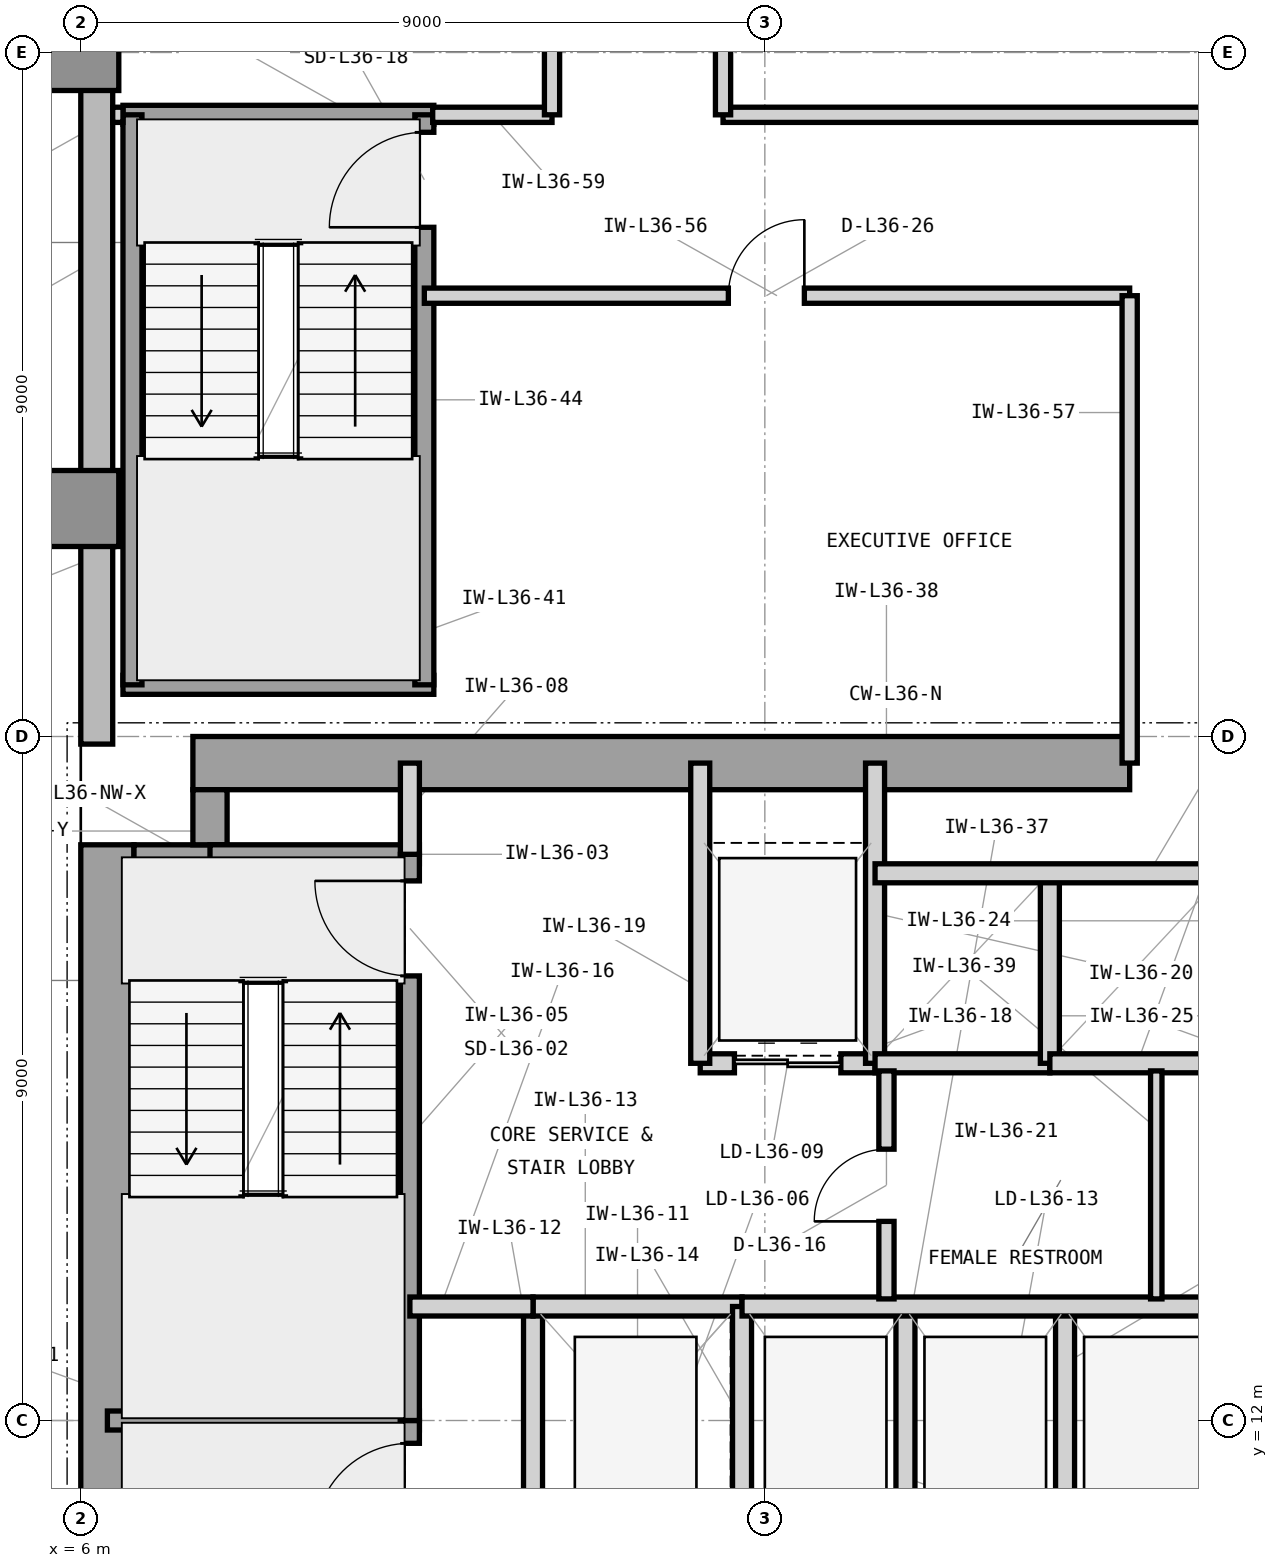
"""IFC4 building model, lengths in metres.
Left out: names, types, materials, properties, quantities, classifications, styles, units other than length and angle.
Written with IfcOpenShell. Run it as: python <this file> out.ifc"""

import sys

from ifc_helpers import new_model, si_unit, direction, frame, frame_2d, origin, origin_2d, place, context, subcontext, project, spatial, rectangle, extrude, element, fill, save


model = new_model("IFC4")
c1 = context("Model", 3, precision=1e-05, world=origin(), true_north=direction((0.0, 1.0)))
c2 = subcontext(c1, "Body", "Model", "MODEL_VIEW")
j1 = project(units=[si_unit("LENGTHUNIT", "METRE"), si_unit("PLANEANGLEUNIT", "RADIAN")], contexts=[c1])
p1 = place(None, origin())
s1 = spatial("IfcSite", under=j1, at=p1, CompositionType="ELEMENT")
p2 = place(p1, origin())
s2 = spatial("IfcBuilding", under=s1, at=p2, CompositionType="ELEMENT")
p3 = place(p2, frame((0.0, 0.0, 151.8)))
s3 = spatial("IfcBuildingStorey", under=s2, at=p3, CompositionType="ELEMENT", Elevation=151.8)
p4 = place(p3, frame((6.35, 4.425, 0.0), z_axis=(0.0, 0.0, 1.0), x_axis=(0.0, 1.0, 0.0)))
e1 = element("IfcWall", 1, at=p4, inside=s3, PredefinedType="SHEAR", context=c2, shape_type="SweptSolid", body=[
    extrude(rectangle(XDim=15.15, YDim=0.7, at=frame_2d((7.575, 0.0))), origin(), (0.0, 0.0, 1.0), 3.9),
])
p5 = place(p3, frame((7.475, 20.65, 0.0), z_axis=(0.0, 0.0, 1.0), x_axis=(1.0, 0.0, 0.0)))
e2 = element("IfcWall", 2, at=p5, inside=s3, PredefinedType="SHEAR", context=c2, shape_type="SweptSolid", body=[
    extrude(rectangle(XDim=12.325, YDim=0.7, at=frame_2d((6.163, 0.0))), origin(), (0.0, 0.0, 1.0), 3.9),
])
p6 = place(p3, frame((6.7, 19.35, 0.0), z_axis=(0.0, 0.0, 1.0), x_axis=(1.0, 0.0, 0.0)))
e3 = element("IfcWall", 3, at=p6, inside=s3, PredefinedType="SHEAR", context=c2, shape_type="SweptSolid", body=[
    extrude(rectangle(XDim=1.225, YDim=0.45, at=frame_2d((0.613, 0.0))), origin(), (0.0, 0.0, 1.0), 3.9),
])
p7 = place(p3, frame((7.7, 19.575, 0.0), z_axis=(0.0, 0.0, 1.0), x_axis=(0.0, 1.0, 0.0)))
e4 = element("IfcWall", 4, at=p7, inside=s3, PredefinedType="SHEAR", context=c2, shape_type="SweptSolid", body=[
    extrude(rectangle(XDim=0.725, YDim=0.45, at=frame_2d((0.363, 0.0))), origin(), (0.0, 0.0, 1.0), 3.9),
])
for number, where, z_axis, x_axis in (
    (5, (6.0, 24.0, 0.0), (0.0, 0.0, 1.0), (1.0, 0.0, 0.0)),
    (6, (6.0, 30.0, 0.0), (0.0, 0.0, 1.0), (1.0, 0.0, 0.0)),
):
    element("IfcColumn", number, at=place(p3, frame(where, z_axis=z_axis, x_axis=x_axis)), inside=s3, PredefinedType="COLUMN", context=c2, shape_type="SweptSolid", body=[
        extrude(rectangle(XDim=1.0, YDim=1.0, at=origin_2d()), origin(), (0.0, 0.0, 1.0), 3.9),
    ])
p8 = place(p3, frame((6.21, 46.4, 0.0), z_axis=(0.0, 0.0, 1.0), x_axis=(0.0, -1.0, 0.0)))
e7 = element("IfcWall", 7, at=p8, inside=s3, PredefinedType="STANDARD", context=c2, shape_type="SweptSolid", body=[
    extrude(rectangle(XDim=25.5, YDim=0.42, at=frame_2d((12.75, 0.0))), origin(), (0.0, 0.0, 1.0), 3.62),
])
p9 = place(p8, frame((11.5, 0.0, 0.85)))
e8 = element("IfcOpeningElement", 8, at=p9, cuts=e7, PredefinedType="OPENING", context=c2, shape_type="SweptSolid", body=[
    extrude(rectangle(XDim=2.5, YDim=2.25, at=frame_2d((1.25, 1.125))), frame((0.0, 0.22, 0.0), z_axis=(0.0, -1.0, 0.0), x_axis=(1.0, 0.0, 0.0)), (0.0, 0.0, 1.0), 0.44),
])
p10 = place(p3, frame((6.35, 12.0, 0.0), z_axis=(0.0, 0.0, 1.0), x_axis=(1.0, 0.0, 0.0)))
e9 = element("IfcWall", 9, at=p10, inside=s3, PredefinedType="SHEAR", context=c2, shape_type="SweptSolid", body=[
    extrude(rectangle(XDim=4.105, YDim=0.25, at=frame_2d((2.052, 0.0))), origin(), (0.0, 0.0, 1.0), 3.9),
])
p11 = place(p3, frame((7.7, 19.45, 0.0), z_axis=(0.0, 0.0, 1.0), x_axis=(1.0, 0.0, 0.0)))
e10 = element("IfcWall", 10, at=p11, inside=s3, PredefinedType="SHEAR", context=c2, shape_type="SweptSolid", body=[
    extrude(rectangle(XDim=2.755, YDim=0.25, at=frame_2d((1.377, 0.0))), origin(), (0.0, 0.0, 1.0), 3.9),
])
p12 = place(p3, frame((10.33, 4.55, 0.0), z_axis=(0.0, 0.0, 1.0), x_axis=(0.0, 1.0, 0.0)))
e11 = element("IfcWall", 11, at=p12, inside=s3, PredefinedType="SHEAR", context=c2, shape_type="SweptSolid", body=[
    extrude(rectangle(XDim=7.45, YDim=0.25, at=frame_2d((3.725, 0.0))), origin(), (0.0, 0.0, 1.0), 3.9),
])
p13 = place(p12, frame((5.9, 0.0, 0.0)))
e12 = element("IfcOpeningElement", 12, at=p13, cuts=e11, PredefinedType="OPENING", context=c2, shape_type="SweptSolid", body=[
    extrude(rectangle(XDim=1.25, YDim=2.2, at=frame_2d((0.625, 1.1))), frame((0.0, 0.135, 0.0), z_axis=(0.0, -1.0, 0.0), x_axis=(1.0, 0.0, 0.0)), (0.0, 0.0, 1.0), 0.27),
])
p14 = place(p3, frame((10.33, 12.0, 0.0), z_axis=(0.0, 0.0, 1.0), x_axis=(0.0, 1.0, 0.0)))
e13 = element("IfcWall", 13, at=p14, inside=s3, PredefinedType="SHEAR", context=c2, shape_type="SweptSolid", body=[
    extrude(rectangle(XDim=7.45, YDim=0.25, at=frame_2d((3.725, 0.0))), origin(), (0.0, 0.0, 1.0), 3.9),
])
p15 = place(p14, frame((5.85, 0.0, 0.0)))
e14 = element("IfcOpeningElement", 14, at=p15, cuts=e13, PredefinedType="OPENING", context=c2, shape_type="SweptSolid", body=[
    extrude(rectangle(XDim=1.25, YDim=2.2, at=frame_2d((0.625, 1.1))), frame((0.0, 0.135, 0.0), z_axis=(0.0, -1.0, 0.0), x_axis=(1.0, 0.0, 0.0)), (0.0, 0.0, 1.0), 0.27),
])
p16 = place(p3, frame((10.33, 19.45, 0.0), z_axis=(0.0, 0.0, 1.0), x_axis=(0.0, 1.0, 0.0)))
e15 = element("IfcWall", 15, at=p16, inside=s3, PredefinedType="PARTITIONING", context=c2, shape_type="SweptSolid", body=[
    extrude(rectangle(XDim=1.2, YDim=0.25, at=frame_2d((0.6, 0.0))), origin(), (0.0, 0.0, 1.0), 2.754),
])
p17 = place(p3, frame((11.95, 10.5, 0.0), z_axis=(0.0, 0.0, 1.0), x_axis=(0.0, 1.0, 0.0)))
e16 = element("IfcWall", 16, at=p17, inside=s3, PredefinedType="PARTITIONING", context=c2, shape_type="SweptSolid", body=[
    extrude(rectangle(XDim=3.0, YDim=0.25, at=frame_2d((1.5, 0.0))), origin(), (0.0, 0.0, 1.0), 3.61),
])
p18 = place(p3, frame((11.95, 13.5, 0.0), z_axis=(0.0, 0.0, 1.0), x_axis=(1.0, 0.0, 0.0)))
e17 = element("IfcWall", 17, at=p18, inside=s3, PredefinedType="PARTITIONING", context=c2, shape_type="SweptSolid", body=[
    extrude(rectangle(XDim=2.75, YDim=0.25, at=frame_2d((1.375, 0.0))), origin(), (0.0, 0.0, 1.0), 3.066),
])
p19 = place(p3, frame((14.7, 10.5, 0.0), z_axis=(0.0, 0.0, 1.0), x_axis=(0.0, 1.0, 0.0)))
e18 = element("IfcWall", 18, at=p19, inside=s3, PredefinedType="PARTITIONING", context=c2, shape_type="SweptSolid", body=[
    extrude(rectangle(XDim=3.0, YDim=0.25, at=frame_2d((1.5, 0.0))), origin(), (0.0, 0.0, 1.0), 3.61),
])
p20 = place(p3, frame((10.33, 13.5, 0.0), z_axis=(0.0, 0.0, 1.0), x_axis=(1.0, 0.0, 0.0)))
e19 = element("IfcWall", 19, at=p20, inside=s3, PredefinedType="PARTITIONING", context=c2, shape_type="SweptSolid", body=[
    extrude(rectangle(XDim=1.62, YDim=0.25, at=frame_2d((0.81, 0.0))), origin(), (0.0, 0.0, 1.0), 3.066),
])
p21 = place(p3, frame((14.15, 16.7, 0.0), z_axis=(0.0, 0.0, 1.0), x_axis=(1.0, 0.0, 0.0)))
e20 = element("IfcWall", 20, at=p21, inside=s3, PredefinedType="PARTITIONING", context=c2, shape_type="SweptSolid", body=[
    extrude(rectangle(XDim=2.3, YDim=0.25, at=frame_2d((1.15, 0.0))), origin(), (0.0, 0.0, 1.0), 3.066),
])
p22 = place(p21, frame((0.45, 0.0, 0.0)))
e21 = element("IfcOpeningElement", 21, at=p22, cuts=e20, PredefinedType="OPENING", context=c2, shape_type="SweptSolid", body=[
    extrude(rectangle(XDim=1.4, YDim=2.35, at=frame_2d((0.7, 1.175))), frame((0.0, 0.135, 0.0), z_axis=(0.0, -1.0, 0.0), x_axis=(1.0, 0.0, 0.0)), (0.0, 0.0, 1.0), 0.27),
])
for number, where, z_axis, x_axis in (
    (22, (14.15, 16.7, 0.0), (0.0, 0.0, 1.0), (0.0, 1.0, 0.0)),
    (23, (16.45, 16.7, 0.0), (0.0, 0.0, 1.0), (0.0, 1.0, 0.0)),
):
    element("IfcWall", number, at=place(p3, frame(where, z_axis=z_axis, x_axis=x_axis)), inside=s3, PredefinedType="PARTITIONING", context=c2, shape_type="SweptSolid", body=[
        extrude(rectangle(XDim=3.95, YDim=0.25, at=frame_2d((1.975, 0.0))), origin(), (0.0, 0.0, 1.0), 3.61),
    ])
p23 = place(p3, frame((16.45, 16.7, 0.0), z_axis=(0.0, 0.0, 1.0), x_axis=(1.0, 0.0, 0.0)))
e24 = element("IfcWall", 24, at=p23, inside=s3, PredefinedType="PARTITIONING", context=c2, shape_type="SweptSolid", body=[
    extrude(rectangle(XDim=2.3, YDim=0.25, at=frame_2d((1.15, 0.0))), origin(), (0.0, 0.0, 1.0), 3.066),
])
p24 = place(p3, frame((18.75, 16.7, 0.0), z_axis=(0.0, 0.0, 1.0), x_axis=(0.0, 1.0, 0.0)))
e25 = element("IfcWall", 25, at=p24, inside=s3, PredefinedType="PARTITIONING", context=c2, shape_type="SweptSolid", body=[
    extrude(rectangle(XDim=2.5, YDim=0.25, at=frame_2d((1.25, 0.0))), origin(), (0.0, 0.0, 1.0), 3.61),
])
p25 = place(p3, frame((18.75, 16.7, 0.0), z_axis=(0.0, 0.0, 1.0), x_axis=(1.0, 0.0, 0.0)))
e26 = element("IfcWall", 26, at=p25, inside=s3, PredefinedType="PARTITIONING", context=c2, shape_type="SweptSolid", body=[
    extrude(rectangle(XDim=2.3, YDim=0.25, at=frame_2d((1.15, 0.0))), origin(), (0.0, 0.0, 1.0), 3.066),
])
p26 = place(p3, frame((16.45, 19.2, 0.0), z_axis=(0.0, 0.0, 1.0), x_axis=(1.0, 0.0, 0.0)))
e27 = element("IfcWall", 27, at=p26, inside=s3, PredefinedType="PARTITIONING", context=c2, shape_type="SweptSolid", body=[
    extrude(rectangle(XDim=7.2, YDim=0.25, at=frame_2d((3.6, 0.0))), origin(), (0.0, 0.0, 1.0), 3.61),
])
for number, where, z_axis, x_axis in (
    (28, (16.85, 10.5, 0.0), (0.0, 0.0, 1.0), (0.0, 1.0, 0.0)),
    (29, (18.95, 10.5, 0.0), (0.0, 0.0, 1.0), (0.0, 1.0, 0.0)),
):
    element("IfcWall", number, at=place(p3, frame(where, z_axis=z_axis, x_axis=x_axis)), inside=s3, PredefinedType="PARTITIONING", context=c2, shape_type="SweptSolid", body=[
        extrude(rectangle(XDim=3.0, YDim=0.25, at=frame_2d((1.5, 0.0))), origin(), (0.0, 0.0, 1.0), 3.61),
    ])
p27 = place(p3, frame((14.7, 13.5, 0.0), z_axis=(0.0, 0.0, 1.0), x_axis=(1.0, 0.0, 0.0)))
e30 = element("IfcWall", 30, at=p27, inside=s3, PredefinedType="PARTITIONING", context=c2, shape_type="SweptSolid", body=[
    extrude(rectangle(XDim=8.95, YDim=0.25, at=frame_2d((4.475, 0.0))), origin(), (0.0, 0.0, 1.0), 3.066),
])
p28 = place(p3, frame((16.6, 13.6, 0.0), z_axis=(0.0, 0.0, 1.0), x_axis=(0.0, 1.0, 0.0)))
e31 = element("IfcWall", 31, at=p28, inside=s3, PredefinedType="PARTITIONING", context=c2, shape_type="SweptSolid", body=[
    extrude(rectangle(XDim=3.0, YDim=0.2, at=frame_2d((1.5, 0.0))), origin(), (0.0, 0.0, 1.0), 3.61),
])
p29 = place(p28, frame((1.02, 0.0, 0.0)))
e32 = element("IfcOpeningElement", 32, at=p29, cuts=e31, PredefinedType="OPENING", context=c2, shape_type="SweptSolid", body=[
    extrude(rectangle(XDim=0.95, YDim=2.1, at=frame_2d((0.475, 1.05))), frame((0.0, 0.11, 0.0), z_axis=(0.0, -1.0, 0.0), x_axis=(1.0, 0.0, 0.0)), (0.0, 0.0, 1.0), 0.22),
])
p30 = place(p3, frame((20.15, 13.6, 0.0), z_axis=(0.0, 0.0, 1.0), x_axis=(0.0, 1.0, 0.0)))
e33 = element("IfcWall", 33, at=p30, inside=s3, PredefinedType="PARTITIONING", context=c2, shape_type="SweptSolid", body=[
    extrude(rectangle(XDim=3.0, YDim=0.15, at=frame_2d((1.5, 0.0))), origin(), (0.0, 0.0, 1.0), 3.61),
])
for number, where, z_axis, x_axis in (
    (34, (6.555, 21.68, 0.0), (0.0, 0.0, 1.0), (1.0, 0.0, 0.0)),
    (35, (6.555, 29.18, 0.0), (0.0, 0.0, 1.0), (1.0, 0.0, 0.0)),
):
    element("IfcWall", number, at=place(p3, frame(where, z_axis=z_axis, x_axis=x_axis)), inside=s3, PredefinedType="SHEAR", context=c2, shape_type="SweptSolid", body=[
        extrude(rectangle(XDim=4.09, YDim=0.25, at=frame_2d((2.045, 0.0))), origin(), (0.0, 0.0, 1.0), 3.9),
    ])
p31 = place(p3, frame((6.68, 21.68, 0.0), z_axis=(0.0, 0.0, 1.0), x_axis=(0.0, 1.0, 0.0)))
e36 = element("IfcWall", 36, at=p31, inside=s3, PredefinedType="SHEAR", context=c2, shape_type="SweptSolid", body=[
    extrude(rectangle(XDim=7.5, YDim=0.25, at=frame_2d((3.75, 0.0))), origin(), (0.0, 0.0, 1.0), 3.9),
])
p32 = place(p3, frame((10.52, 21.68, 0.0), z_axis=(0.0, 0.0, 1.0), x_axis=(0.0, 1.0, 0.0)))
e37 = element("IfcWall", 37, at=p32, inside=s3, PredefinedType="SHEAR", context=c2, shape_type="SweptSolid", body=[
    extrude(rectangle(XDim=7.5, YDim=0.25, at=frame_2d((3.75, 0.0))), origin(), (0.0, 0.0, 1.0), 3.9),
])
p33 = place(p32, frame((6.02, 0.0, 0.0)))
e38 = element("IfcOpeningElement", 38, at=p33, cuts=e37, PredefinedType="OPENING", context=c2, shape_type="SweptSolid", body=[
    extrude(rectangle(XDim=1.25, YDim=2.2, at=frame_2d((0.625, 1.1))), frame((0.0, 0.135, 0.0), z_axis=(0.0, -1.0, 0.0), x_axis=(1.0, 0.0, 0.0)), (0.0, 0.0, 1.0), 0.27),
])
p34 = place(p3, frame((10.52, 26.8, 0.0), z_axis=(0.0, 0.0, 1.0), x_axis=(1.0, 0.0, 0.0)))
e39 = element("IfcWall", 39, at=p34, inside=s3, PredefinedType="PARTITIONING", context=c2, shape_type="SweptSolid", body=[
    extrude(rectangle(XDim=9.28, YDim=0.2, at=frame_2d((4.64, 0.0))), origin(), (0.0, 0.0, 1.0), 3.61),
])
p35 = place(p34, frame((4.0, 0.0, 0.0)))
e40 = element("IfcOpeningElement", 40, at=p35, cuts=e39, PredefinedType="OPENING", context=c2, shape_type="SweptSolid", body=[
    extrude(rectangle(XDim=1.0, YDim=2.15, at=frame_2d((0.5, 1.075))), frame((0.0, 0.11, 0.0), z_axis=(0.0, -1.0, 0.0), x_axis=(1.0, 0.0, 0.0)), (0.0, 0.0, 1.0), 0.22),
])
p36 = place(p3, frame((19.8, 20.65, 0.0), z_axis=(0.0, 0.0, 1.0), x_axis=(0.0, 1.0, 0.0)))
e41 = element("IfcWall", 41, at=p36, inside=s3, PredefinedType="PARTITIONING", context=c2, shape_type="SweptSolid", body=[
    extrude(rectangle(XDim=6.15, YDim=0.2, at=frame_2d((3.075, 0.0))), origin(), (0.0, 0.0, 1.0), 3.61),
])
p37 = place(p3, frame((6.42, 29.18, 0.0), z_axis=(0.0, 0.0, 1.0), x_axis=(1.0, 0.0, 0.0)))
e42 = element("IfcWall", 42, at=p37, inside=s3, PredefinedType="PARTITIONING", context=c2, shape_type="SweptSolid", body=[
    extrude(rectangle(XDim=0.135, YDim=0.2, at=frame_2d((0.067, 0.0))), origin(), (0.0, 0.0, 1.0), 3.61),
])
p38 = place(p3, frame((10.63, 29.18, 0.0), z_axis=(0.0, 0.0, 1.0), x_axis=(1.0, 0.0, 0.0)))
e43 = element("IfcWall", 43, at=p38, inside=s3, PredefinedType="PARTITIONING", context=c2, shape_type="SweptSolid", body=[
    extrude(rectangle(XDim=1.57, YDim=0.2, at=frame_2d((0.785, 0.0))), origin(), (0.0, 0.0, 1.0), 3.61),
])
p39 = place(p3, frame((14.45, 29.18, 0.0), z_axis=(0.0, 0.0, 1.0), x_axis=(1.0, 0.0, 0.0)))
e44 = element("IfcWall", 44, at=p39, inside=s3, PredefinedType="PARTITIONING", context=c2, shape_type="SweptSolid", body=[
    extrude(rectangle(XDim=9.37, YDim=0.2, at=frame_2d((4.685, 0.0))), origin(), (0.0, 0.0, 1.0), 3.61),
])
p40 = place(p3, frame((12.2, 29.18, 0.0), z_axis=(0.0, 0.0, 1.0), x_axis=(0.0, 1.0, 0.0)))
e45 = element("IfcWall", 45, at=p40, inside=s3, PredefinedType="PARTITIONING", context=c2, shape_type="SweptSolid", body=[
    extrude(rectangle(XDim=12.32, YDim=0.2, at=frame_2d((6.16, 0.0))), origin(), (0.0, 0.0, 1.0), 3.61),
])
p41 = place(p40, frame((5.66, 0.0, 0.0)))
e46 = element("IfcOpeningElement", 46, at=p41, cuts=e45, PredefinedType="OPENING", context=c2, shape_type="SweptSolid", body=[
    extrude(rectangle(XDim=1.0, YDim=2.15, at=frame_2d((0.5, 1.075))), frame((0.0, 0.11, 0.0), z_axis=(0.0, -1.0, 0.0), x_axis=(1.0, 0.0, 0.0)), (0.0, 0.0, 1.0), 0.22),
])
p42 = place(p3, frame((14.45, 29.18, 0.0), z_axis=(0.0, 0.0, 1.0), x_axis=(0.0, 1.0, 0.0)))
e47 = element("IfcWall", 47, at=p42, inside=s3, PredefinedType="PARTITIONING", context=c2, shape_type="SweptSolid", body=[
    extrude(rectangle(XDim=7.0, YDim=0.2, at=frame_2d((3.5, 0.0))), origin(), (0.0, 0.0, 1.0), 3.61),
])
p43 = place(p42, frame((3.0, 0.0, 0.0)))
e48 = element("IfcOpeningElement", 48, at=p43, cuts=e47, PredefinedType="OPENING", context=c2, shape_type="SweptSolid", body=[
    extrude(rectangle(XDim=1.0, YDim=2.15, at=frame_2d((0.5, 1.075))), frame((0.0, 0.11, 0.0), z_axis=(0.0, -1.0, 0.0), x_axis=(1.0, 0.0, 0.0)), (0.0, 0.0, 1.0), 0.22),
])
p44 = place(p13, origin())
e49 = element("IfcDoor", 49, at=p44, inside=s3, OperationType="SINGLE_SWING_LEFT", PredefinedType="DOOR", context=c2, shape_type="SweptSolid", body=[
    extrude(rectangle(XDim=1.25, YDim=2.2, at=frame_2d((0.625, 1.1))), frame((0.0, 0.025, 0.0), z_axis=(0.0, -1.0, 0.0), x_axis=(1.0, 0.0, 0.0)), (0.0, 0.0, 1.0), 0.05),
])
fill(e12, e49)
p45 = place(p15, origin())
e50 = element("IfcDoor", 50, at=p45, inside=s3, OperationType="SINGLE_SWING_RIGHT", PredefinedType="DOOR", context=c2, shape_type="SweptSolid", body=[
    extrude(rectangle(XDim=1.25, YDim=2.2, at=frame_2d((0.625, 1.1))), frame((0.0, 0.025, 0.0), z_axis=(0.0, -1.0, 0.0), x_axis=(1.0, 0.0, 0.0)), (0.0, 0.0, 1.0), 0.05),
])
fill(e14, e50)
p46 = place(p22, origin())
e51 = element("IfcDoor", 51, at=p46, inside=s3, OperationType="DOUBLE_DOOR_SLIDING", PredefinedType="DOOR", context=c2, shape_type="SweptSolid", body=[
    extrude(rectangle(XDim=1.4, YDim=2.35, at=frame_2d((0.7, 1.175))), frame((0.0, 0.025, 0.0), z_axis=(0.0, -1.0, 0.0), x_axis=(1.0, 0.0, 0.0)), (0.0, 0.0, 1.0), 0.05),
])
fill(e21, e51)
p47 = place(p29, origin())
e52 = element("IfcDoor", 52, at=p47, inside=s3, OperationType="SINGLE_SWING_LEFT", PredefinedType="DOOR", context=c2, shape_type="SweptSolid", body=[
    extrude(rectangle(XDim=0.95, YDim=2.1, at=frame_2d((0.475, 1.05))), frame((0.0, 0.025, 0.0), z_axis=(0.0, -1.0, 0.0), x_axis=(1.0, 0.0, 0.0)), (0.0, 0.0, 1.0), 0.05),
])
fill(e32, e52)
p48 = place(p33, origin())
e53 = element("IfcDoor", 53, at=p48, inside=s3, OperationType="SINGLE_SWING_LEFT", PredefinedType="DOOR", context=c2, shape_type="SweptSolid", body=[
    extrude(rectangle(XDim=1.25, YDim=2.2, at=frame_2d((0.625, 1.1))), frame((0.0, 0.025, 0.0), z_axis=(0.0, -1.0, 0.0), x_axis=(1.0, 0.0, 0.0)), (0.0, 0.0, 1.0), 0.05),
])
fill(e38, e53)
p49 = place(p35, origin())
e54 = element("IfcDoor", 54, at=p49, inside=s3, OperationType="SINGLE_SWING_RIGHT", PredefinedType="DOOR", context=c2, shape_type="SweptSolid", body=[
    extrude(rectangle(XDim=1.0, YDim=2.15, at=frame_2d((0.5, 1.075))), frame((0.0, 0.025, 0.0), z_axis=(0.0, -1.0, 0.0), x_axis=(1.0, 0.0, 0.0)), (0.0, 0.0, 1.0), 0.05),
])
fill(e40, e54)
save(model, sys.argv[1])
